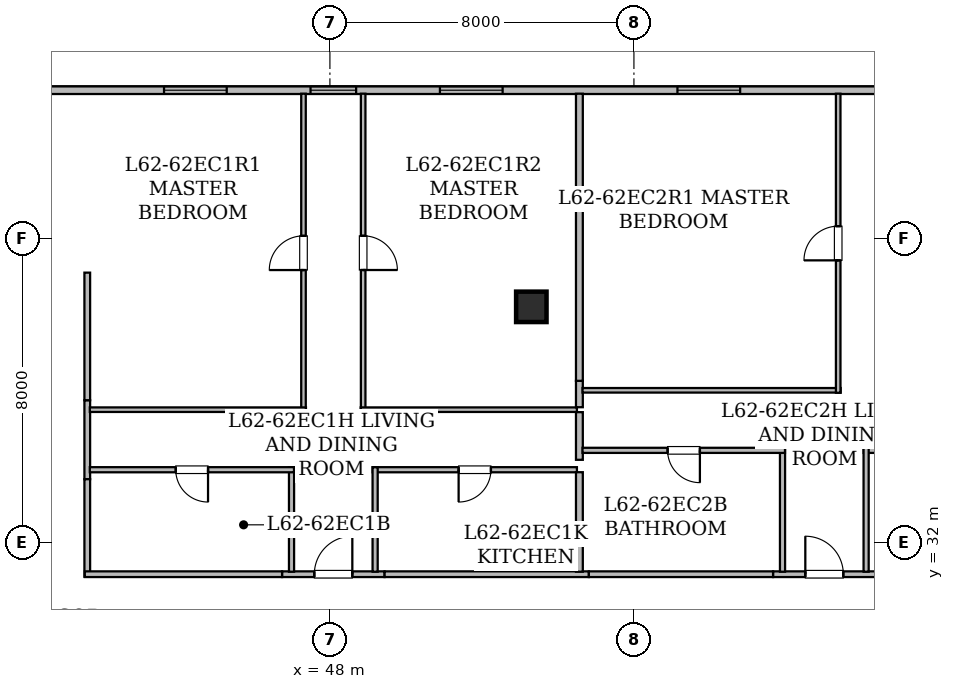
"""IFC4 building model, lengths in metres.
Left out: names, types, materials, properties, quantities, classifications, styles, units other than length and angle.
Written with IfcOpenShell. Run it as: python <this file> out.ifc"""

import sys

from ifc_helpers import new_model, si_unit, direction, frame, frame_2d, origin, origin_2d, place, context, subcontext, project, spatial, rectangle, hollow_rectangle, extrude, element, fill, save


model = new_model("IFC4")
c1 = context("Model", 3, precision=1e-05, world=origin(), true_north=direction((0.0, 1.0)))
c2 = subcontext(c1, "Body", "Model", "MODEL_VIEW")
j1 = project(units=[si_unit("LENGTHUNIT", "METRE"), si_unit("PLANEANGLEUNIT", "RADIAN")], contexts=[c1])
p1 = place(None, origin())
s1 = spatial("IfcSite", under=j1, at=p1, CompositionType="ELEMENT")
p2 = place(p1, origin())
s2 = spatial("IfcBuilding", under=s1, at=p2, CompositionType="ELEMENT")
p3 = place(p2, frame((0.0, 0.0, 242.75)))
s3 = spatial("IfcBuildingStorey", under=s2, at=p3, CompositionType="ELEMENT", Elevation=242.75)
for number, where, z_axis, x_axis in (
    (1, (51.083, 41.5, 0.0), (0.0, 0.0, 1.0), (1.0, 0.0, 0.0)),
    (2, (53.3, 38.2, 0.0), (0.0, 0.0, 1.0), (1.0, 0.0, 0.0)),
):
    element("IfcColumn", number, at=place(p3, frame(where, z_axis=z_axis, x_axis=x_axis)), inside=s3, PredefinedType="COLUMN", context=c2, shape_type="SweptSolid", body=[
        extrude(hollow_rectangle(XDim=0.8, YDim=0.8, WallThickness=0.04, at=origin_2d()), origin(), (0.0, 0.0, 1.0), 3.65),
    ])
p4 = place(p3, frame((24.302, 43.9, 0.0), z_axis=(0.0, 0.0, 1.0), x_axis=(1.0, 0.0, 0.0)))
e3 = element("IfcWall", 3, at=p4, inside=s3, PredefinedType="STANDARD", context=c2, shape_type="SweptSolid", body=[
    extrude(rectangle(XDim=41.457, YDim=0.2, at=frame_2d((20.729, 0.0))), origin(), (0.0, 0.0, 1.0), 3.43),
])
p5 = place(p4, frame((5.573, 0.0, 0.85)))
e4 = element("IfcOpeningElement", 4, at=p5, cuts=e3, PredefinedType="OPENING", context=c2, shape_type="SweptSolid", body=[
    extrude(rectangle(XDim=1.65, YDim=1.55, at=frame_2d((0.825, 0.775))), frame((0.0, 0.11, 0.0), z_axis=(0.0, -1.0, 0.0), x_axis=(1.0, 0.0, 0.0)), (0.0, 0.0, 1.0), 0.22),
])
p6 = place(p4, frame((0.604, 0.0, 0.85)))
e5 = element("IfcOpeningElement", 5, at=p6, cuts=e3, PredefinedType="OPENING", context=c2, shape_type="SweptSolid", body=[
    extrude(rectangle(XDim=1.65, YDim=1.55, at=frame_2d((0.825, 0.775))), frame((0.0, 0.11, 0.0), z_axis=(0.0, -1.0, 0.0), x_axis=(1.0, 0.0, 0.0)), (0.0, 0.0, 1.0), 0.22),
])
p7 = place(p4, frame((23.188, 0.0, 0.8)))
e6 = element("IfcOpeningElement", 6, at=p7, cuts=e3, PredefinedType="OPENING", context=c2, shape_type="SweptSolid", body=[
    extrude(rectangle(XDim=1.2, YDim=1.5, at=frame_2d((0.6, 0.75))), frame((0.0, 0.11, 0.0), z_axis=(0.0, -1.0, 0.0), x_axis=(1.0, 0.0, 0.0)), (0.0, 0.0, 1.0), 0.22),
])
p8 = place(p4, frame((19.333, 0.0, 0.85)))
e7 = element("IfcOpeningElement", 7, at=p8, cuts=e3, PredefinedType="OPENING", context=c2, shape_type="SweptSolid", body=[
    extrude(rectangle(XDim=1.65, YDim=1.55, at=frame_2d((0.825, 0.775))), frame((0.0, 0.11, 0.0), z_axis=(0.0, -1.0, 0.0), x_axis=(1.0, 0.0, 0.0)), (0.0, 0.0, 1.0), 0.22),
])
p9 = place(p4, frame((26.593, 0.0, 0.85)))
e8 = element("IfcOpeningElement", 8, at=p9, cuts=e3, PredefinedType="OPENING", context=c2, shape_type="SweptSolid", body=[
    extrude(rectangle(XDim=1.65, YDim=1.55, at=frame_2d((0.825, 0.775))), frame((0.0, 0.11, 0.0), z_axis=(0.0, -1.0, 0.0), x_axis=(1.0, 0.0, 0.0)), (0.0, 0.0, 1.0), 0.22),
])
p10 = place(p4, frame((32.843, 0.0, 0.85)))
e9 = element("IfcOpeningElement", 9, at=p10, cuts=e3, PredefinedType="OPENING", context=c2, shape_type="SweptSolid", body=[
    extrude(rectangle(XDim=1.65, YDim=1.55, at=frame_2d((0.825, 0.775))), frame((0.0, 0.11, 0.0), z_axis=(0.0, -1.0, 0.0), x_axis=(1.0, 0.0, 0.0)), (0.0, 0.0, 1.0), 0.22),
])
p11 = place(p3, frame((41.615, 35.743, 0.0), z_axis=(0.0, 0.0, 1.0), x_axis=(0.0, -1.0, 0.0)))
e10 = element("IfcWall", 10, at=p11, inside=s3, PredefinedType="STANDARD", context=c2, shape_type="SweptSolid", body=[
    extrude(rectangle(XDim=2.078, YDim=0.15, at=frame_2d((1.039, 0.0))), origin(), (0.0, 0.0, 1.0), 3.43),
])
p12 = place(p3, frame((46.741, 31.165, 0.0), z_axis=(0.0, 0.0, 1.0), x_axis=(1.0, 0.0, 0.0)))
e11 = element("IfcWall", 11, at=p12, inside=s3, PredefinedType="STANDARD", context=c2, shape_type="SweptSolid", body=[
    extrude(rectangle(XDim=2.698, YDim=0.15, at=frame_2d((1.349, 0.0))), origin(), (0.0, 0.0, 1.0), 3.43),
])
p13 = place(p12, frame((0.849, 0.0, 0.0)))
e12 = element("IfcOpeningElement", 12, at=p13, cuts=e11, PredefinedType="OPENING", context=c2, shape_type="SweptSolid", body=[
    extrude(rectangle(XDim=1.0, YDim=2.15, at=frame_2d((0.5, 1.075))), frame((0.0, 0.085, 0.0), z_axis=(0.0, -1.0, 0.0), x_axis=(1.0, 0.0, 0.0)), (0.0, 0.0, 1.0), 0.17),
])
p14 = place(p3, frame((41.615, 33.665, 0.0), z_axis=(0.0, 0.0, 1.0), x_axis=(0.0, -1.0, 0.0)))
e13 = element("IfcWall", 13, at=p14, inside=s3, PredefinedType="STANDARD", context=c2, shape_type="SweptSolid", body=[
    extrude(rectangle(XDim=2.565, YDim=0.15, at=frame_2d((1.282, 0.0))), origin(), (0.0, 0.0, 1.0), 3.107),
])
p15 = place(p3, frame((41.55, 31.165, 0.0), z_axis=(0.0, 0.0, 1.0), x_axis=(1.0, 0.0, 0.0)))
e14 = element("IfcWall", 14, at=p15, inside=s3, PredefinedType="STANDARD", context=c2, shape_type="SweptSolid", body=[
    extrude(rectangle(XDim=5.191, YDim=0.15, at=frame_2d((2.595, 0.0))), origin(), (0.0, 0.0, 1.0), 3.43),
])
p16 = place(p3, frame((49.439, 31.165, 0.0), z_axis=(0.0, 0.0, 1.0), x_axis=(1.0, 0.0, 0.0)))
e15 = element("IfcWall", 15, at=p16, inside=s3, PredefinedType="STANDARD", context=c2, shape_type="SweptSolid", body=[
    extrude(rectangle(XDim=5.375, YDim=0.15, at=frame_2d((2.688, 0.0))), origin(), (0.0, 0.0, 1.0), 2.725),
])
p17 = place(p3, frame((41.615, 39.1, 0.0), z_axis=(0.0, 0.0, 1.0), x_axis=(0.0, -1.0, 0.0)))
e16 = element("IfcWall", 16, at=p17, inside=s3, PredefinedType="STANDARD", context=c2, shape_type="SweptSolid", body=[
    extrude(rectangle(XDim=3.357, YDim=0.15, at=frame_2d((1.679, 0.0))), origin(), (0.0, 0.0, 1.0), 2.725),
])
p18 = place(p3, frame((59.661, 31.165, 0.0), z_axis=(0.0, 0.0, 1.0), x_axis=(1.0, 0.0, 0.0)))
e17 = element("IfcWall", 17, at=p18, inside=s3, PredefinedType="STANDARD", context=c2, shape_type="SweptSolid", body=[
    extrude(rectangle(XDim=2.698, YDim=0.15, at=frame_2d((1.349, 0.0))), origin(), (0.0, 0.0, 1.0), 3.43),
])
p19 = place(p18, frame((0.849, 0.0, 0.0)))
e18 = element("IfcOpeningElement", 18, at=p19, cuts=e17, PredefinedType="OPENING", context=c2, shape_type="SweptSolid", body=[
    extrude(rectangle(XDim=1.0, YDim=2.15, at=frame_2d((0.5, 1.075))), frame((0.0, 0.085, 0.0), z_axis=(0.0, -1.0, 0.0), x_axis=(1.0, 0.0, 0.0)), (0.0, 0.0, 1.0), 0.17),
])
p20 = place(p3, frame((54.814, 31.165, 0.0), z_axis=(0.0, 0.0, 1.0), x_axis=(1.0, 0.0, 0.0)))
e19 = element("IfcWall", 19, at=p20, inside=s3, PredefinedType="STANDARD", context=c2, shape_type="SweptSolid", body=[
    extrude(rectangle(XDim=4.847, YDim=0.15, at=frame_2d((2.423, 0.0))), origin(), (0.0, 0.0, 1.0), 3.43),
])
p21 = place(p3, frame((46.99, 31.23, 0.0), z_axis=(0.0, 0.0, 1.0), x_axis=(0.0, 1.0, 0.0)))
e20 = element("IfcWall", 20, at=p21, inside=s3, PredefinedType="PARTITIONING", context=c2, shape_type="SweptSolid", body=[
    extrude(rectangle(XDim=2.749, YDim=0.135, at=frame_2d((1.375, 0.0))), origin(), (0.0, 0.0, 1.0), 3.107),
])
p22 = place(p3, frame((47.055, 33.914, 0.0), z_axis=(0.0, 0.0, 1.0), x_axis=(-1.0, 0.0, 0.0)))
e21 = element("IfcWall", 21, at=p22, inside=s3, PredefinedType="PARTITIONING", context=c2, shape_type="SweptSolid", body=[
    extrude(rectangle(XDim=5.373, YDim=0.135, at=frame_2d((2.687, 0.0))), origin(), (0.0, 0.0, 1.0), 3.43),
])
p23 = place(p22, frame((2.262, 0.0, 0.0)))
e22 = element("IfcOpeningElement", 22, at=p23, cuts=e21, PredefinedType="OPENING", context=c2, shape_type="SweptSolid", body=[
    extrude(rectangle(XDim=0.85, YDim=2.1, at=frame_2d((0.425, 1.05))), frame((0.0, 0.077, 0.0), z_axis=(0.0, -1.0, 0.0), x_axis=(1.0, 0.0, 0.0)), (0.0, 0.0, 1.0), 0.155),
])
p24 = place(p3, frame((54.5, 33.914, 0.0), z_axis=(0.0, 0.0, 1.0), x_axis=(-1.0, 0.0, 0.0)))
e23 = element("IfcWall", 23, at=p24, inside=s3, PredefinedType="PARTITIONING", context=c2, shape_type="SweptSolid", body=[
    extrude(rectangle(XDim=5.375, YDim=0.135, at=frame_2d((2.688, 0.0))), origin(), (0.0, 0.0, 1.0), 2.725),
])
p25 = place(p24, frame((2.263, 0.0, 0.0)))
e24 = element("IfcOpeningElement", 24, at=p25, cuts=e23, PredefinedType="OPENING", context=c2, shape_type="SweptSolid", body=[
    extrude(rectangle(XDim=0.85, YDim=2.1, at=frame_2d((0.425, 1.05))), frame((0.0, 0.077, 0.0), z_axis=(0.0, -1.0, 0.0), x_axis=(1.0, 0.0, 0.0)), (0.0, 0.0, 1.0), 0.155),
])
p26 = place(p3, frame((49.19, 33.979, 0.0), z_axis=(0.0, 0.0, 1.0), x_axis=(0.0, -1.0, 0.0)))
e25 = element("IfcWall", 25, at=p26, inside=s3, PredefinedType="PARTITIONING", context=c2, shape_type="SweptSolid", body=[
    extrude(rectangle(XDim=2.749, YDim=0.135, at=frame_2d((1.375, 0.0))), origin(), (0.0, 0.0, 1.0), 3.107),
])
p27 = place(p3, frame((47.305, 35.429, 0.0), z_axis=(0.0, 0.0, 1.0), x_axis=(0.0, 1.0, 0.0)))
e26 = element("IfcWall", 26, at=p27, inside=s3, PredefinedType="PARTITIONING", context=c2, shape_type="SweptSolid", body=[
    extrude(rectangle(XDim=8.379, YDim=0.12, at=frame_2d((4.189, 0.0))), origin(), (0.0, 0.0, 1.0), 2.725),
])
p28 = place(p27, frame((3.739, 0.0, 0.0)))
e27 = element("IfcOpeningElement", 27, at=p28, cuts=e26, PredefinedType="OPENING", context=c2, shape_type="SweptSolid", body=[
    extrude(rectangle(XDim=0.9, YDim=2.1, at=frame_2d((0.45, 1.05))), frame((0.0, 0.07, 0.0), z_axis=(0.0, -1.0, 0.0), x_axis=(1.0, 0.0, 0.0)), (0.0, 0.0, 1.0), 0.14),
])
p29 = place(p3, frame((41.682, 35.494, 0.0), z_axis=(0.0, 0.0, 1.0), x_axis=(1.0, 0.0, 0.0)))
e28 = element("IfcWall", 28, at=p29, inside=s3, PredefinedType="PARTITIONING", context=c2, shape_type="SweptSolid", body=[
    extrude(rectangle(XDim=5.688, YDim=0.12, at=frame_2d((2.844, 0.0))), origin(), (0.0, 0.0, 1.0), 3.43),
])
p30 = place(p3, frame((48.875, 43.808, 0.0), z_axis=(0.0, 0.0, 1.0), x_axis=(0.0, -1.0, 0.0)))
e29 = element("IfcWall", 29, at=p30, inside=s3, PredefinedType="PARTITIONING", context=c2, shape_type="SweptSolid", body=[
    extrude(rectangle(XDim=8.379, YDim=0.12, at=frame_2d((4.189, 0.0))), origin(), (0.0, 0.0, 1.0), 2.725),
])
p31 = place(p30, frame((3.739, 0.0, 0.0)))
e30 = element("IfcOpeningElement", 30, at=p31, cuts=e29, PredefinedType="OPENING", context=c2, shape_type="SweptSolid", body=[
    extrude(rectangle(XDim=0.9, YDim=2.1, at=frame_2d((0.45, 1.05))), frame((0.0, 0.07, 0.0), z_axis=(0.0, -1.0, 0.0), x_axis=(1.0, 0.0, 0.0)), (0.0, 0.0, 1.0), 0.14),
])
p32 = place(p3, frame((48.81, 35.494, 0.0), z_axis=(0.0, 0.0, 1.0), x_axis=(1.0, 0.0, 0.0)))
e31 = element("IfcWall", 31, at=p32, inside=s3, PredefinedType="PARTITIONING", context=c2, shape_type="SweptSolid", body=[
    extrude(rectangle(XDim=5.69, YDim=0.12, at=frame_2d((2.845, 0.0))), origin(), (0.0, 0.0, 1.0), 2.725),
])
p33 = place(p3, frame((54.565, 35.429, 0.0), z_axis=(0.0, 0.0, 1.0), x_axis=(0.0, -1.0, 0.0)))
e32 = element("IfcWall", 32, at=p33, inside=s3, PredefinedType="STANDARD", context=c2, shape_type="SweptSolid", body=[
    extrude(rectangle(XDim=1.254, YDim=0.18, at=frame_2d((0.627, 0.0))), origin(), (0.0, 0.0, 1.0), 3.43),
])
p34 = place(p3, frame((54.565, 33.849, 0.0), z_axis=(0.0, 0.0, 1.0), x_axis=(0.0, -1.0, 0.0)))
e33 = element("IfcWall", 33, at=p34, inside=s3, PredefinedType="STANDARD", context=c2, shape_type="SweptSolid", body=[
    extrude(rectangle(XDim=2.619, YDim=0.18, at=frame_2d((1.31, 0.0))), origin(), (0.0, 0.0, 1.0), 3.107),
])
p35 = place(p3, frame((54.565, 36.253, 0.0), z_axis=(0.0, 0.0, 1.0), x_axis=(0.0, -1.0, 0.0)))
e34 = element("IfcWall", 34, at=p35, inside=s3, PredefinedType="STANDARD", context=c2, shape_type="SweptSolid", body=[
    extrude(rectangle(XDim=0.694, YDim=0.18, at=frame_2d((0.347, 0.0))), origin(), (0.0, 0.0, 1.0), 3.43),
])
p36 = place(p3, frame((54.565, 43.808, 0.0), z_axis=(0.0, 0.0, 1.0), x_axis=(0.0, -1.0, 0.0)))
e35 = element("IfcWall", 35, at=p36, inside=s3, PredefinedType="STANDARD", context=c2, shape_type="SweptSolid", body=[
    extrude(rectangle(XDim=7.555, YDim=0.18, at=frame_2d((3.778, 0.0))), origin(), (0.0, 0.0, 1.0), 2.725),
])
p37 = place(p3, frame((59.91, 31.23, 0.0), z_axis=(0.0, 0.0, 1.0), x_axis=(0.0, 1.0, 0.0)))
e36 = element("IfcWall", 36, at=p37, inside=s3, PredefinedType="PARTITIONING", context=c2, shape_type="SweptSolid", body=[
    extrude(rectangle(XDim=3.259, YDim=0.135, at=frame_2d((1.629, 0.0))), origin(), (0.0, 0.0, 1.0), 3.107),
])
p38 = place(p3, frame((59.975, 34.424, 0.0), z_axis=(0.0, 0.0, 1.0), x_axis=(-1.0, 0.0, 0.0)))
e37 = element("IfcWall", 37, at=p38, inside=s3, PredefinedType="PARTITIONING", context=c2, shape_type="SweptSolid", body=[
    extrude(rectangle(XDim=5.328, YDim=0.135, at=frame_2d((2.664, 0.0))), origin(), (0.0, 0.0, 1.0), 3.43),
])
p39 = place(p38, frame((2.239, 0.0, 0.0)))
e38 = element("IfcOpeningElement", 38, at=p39, cuts=e37, PredefinedType="OPENING", context=c2, shape_type="SweptSolid", body=[
    extrude(rectangle(XDim=0.85, YDim=2.1, at=frame_2d((0.425, 1.05))), frame((0.0, 0.077, 0.0), z_axis=(0.0, -1.0, 0.0), x_axis=(1.0, 0.0, 0.0)), (0.0, 0.0, 1.0), 0.155),
])
p40 = place(p3, frame((69.608, 34.424, 0.0), z_axis=(0.0, 0.0, 1.0), x_axis=(-1.0, 0.0, 0.0)))
e39 = element("IfcWall", 39, at=p40, inside=s3, PredefinedType="PARTITIONING", context=c2, shape_type="SweptSolid", body=[
    extrude(rectangle(XDim=7.563, YDim=0.135, at=frame_2d((3.781, 0.0))), origin(), (0.0, 0.0, 1.0), 2.725),
])
p41 = place(p40, frame((3.357, 0.0, 0.0)))
e40 = element("IfcOpeningElement", 40, at=p41, cuts=e39, PredefinedType="OPENING", context=c2, shape_type="SweptSolid", body=[
    extrude(rectangle(XDim=0.85, YDim=2.1, at=frame_2d((0.425, 1.05))), frame((0.0, 0.077, 0.0), z_axis=(0.0, -1.0, 0.0), x_axis=(1.0, 0.0, 0.0)), (0.0, 0.0, 1.0), 0.155),
])
p42 = place(p3, frame((62.11, 34.489, 0.0), z_axis=(0.0, 0.0, 1.0), x_axis=(0.0, -1.0, 0.0)))
e41 = element("IfcWall", 41, at=p42, inside=s3, PredefinedType="PARTITIONING", context=c2, shape_type="SweptSolid", body=[
    extrude(rectangle(XDim=3.259, YDim=0.135, at=frame_2d((1.629, 0.0))), origin(), (0.0, 0.0, 1.0), 3.107),
])
p43 = place(p3, frame((54.647, 36.004, 0.0), z_axis=(0.0, 0.0, 1.0), x_axis=(1.0, 0.0, 0.0)))
e42 = element("IfcWall", 42, at=p43, inside=s3, PredefinedType="PARTITIONING", context=c2, shape_type="SweptSolid", body=[
    extrude(rectangle(XDim=6.793, YDim=0.12, at=frame_2d((3.396, 0.0))), origin(), (0.0, 0.0, 1.0), 2.725),
])
p44 = place(p3, frame((61.375, 35.939, 0.0), z_axis=(0.0, 0.0, 1.0), x_axis=(0.0, 1.0, 0.0)))
e43 = element("IfcWall", 43, at=p44, inside=s3, PredefinedType="PARTITIONING", context=c2, shape_type="SweptSolid", body=[
    extrude(rectangle(XDim=7.869, YDim=0.12, at=frame_2d((3.935, 0.0))), origin(), (0.0, 0.0, 1.0), 2.725),
])
p45 = place(p44, frame((3.484, 0.0, 0.0)))
e44 = element("IfcOpeningElement", 44, at=p45, cuts=e43, PredefinedType="OPENING", context=c2, shape_type="SweptSolid", body=[
    extrude(rectangle(XDim=0.9, YDim=2.1, at=frame_2d((0.45, 1.05))), frame((0.0, 0.07, 0.0), z_axis=(0.0, -1.0, 0.0), x_axis=(1.0, 0.0, 0.0)), (0.0, 0.0, 1.0), 0.14),
])
p46 = place(p7, origin())
e45 = element("IfcWindow", 45, at=p46, inside=s3, PartitioningType="SINGLE_PANEL", PredefinedType="WINDOW", context=c2, shape_type="SweptSolid", body=[
    extrude(rectangle(XDim=1.2, YDim=1.5, at=frame_2d((0.6, 0.75))), frame((0.0, 0.03, 0.0), z_axis=(0.0, -1.0, 0.0), x_axis=(1.0, 0.0, 0.0)), (0.0, 0.0, 1.0), 0.06),
])
fill(e6, e45)
p47 = place(p8, origin())
e46 = element("IfcWindow", 46, at=p47, inside=s3, PartitioningType="SINGLE_PANEL", PredefinedType="WINDOW", context=c2, shape_type="SweptSolid", body=[
    extrude(rectangle(XDim=1.65, YDim=1.55, at=frame_2d((0.825, 0.775))), frame((0.0, 0.03, 0.0), z_axis=(0.0, -1.0, 0.0), x_axis=(1.0, 0.0, 0.0)), (0.0, 0.0, 1.0), 0.06),
])
fill(e7, e46)
p48 = place(p9, origin())
e47 = element("IfcWindow", 47, at=p48, inside=s3, PartitioningType="SINGLE_PANEL", PredefinedType="WINDOW", context=c2, shape_type="SweptSolid", body=[
    extrude(rectangle(XDim=1.65, YDim=1.55, at=frame_2d((0.825, 0.775))), frame((0.0, 0.03, 0.0), z_axis=(0.0, -1.0, 0.0), x_axis=(1.0, 0.0, 0.0)), (0.0, 0.0, 1.0), 0.06),
])
fill(e8, e47)
p49 = place(p10, origin())
e48 = element("IfcWindow", 48, at=p49, inside=s3, PartitioningType="SINGLE_PANEL", PredefinedType="WINDOW", context=c2, shape_type="SweptSolid", body=[
    extrude(rectangle(XDim=1.65, YDim=1.55, at=frame_2d((0.825, 0.775))), frame((0.0, 0.03, 0.0), z_axis=(0.0, -1.0, 0.0), x_axis=(1.0, 0.0, 0.0)), (0.0, 0.0, 1.0), 0.06),
])
fill(e9, e48)
p50 = place(p13, origin())
e49 = element("IfcDoor", 49, at=p50, inside=s3, OperationType="SINGLE_SWING_RIGHT", PredefinedType="DOOR", context=c2, shape_type="SweptSolid", body=[
    extrude(rectangle(XDim=1.0, YDim=2.15, at=frame_2d((0.5, 1.075))), frame((0.0, 0.025, 0.0), z_axis=(0.0, -1.0, 0.0), x_axis=(1.0, 0.0, 0.0)), (0.0, 0.0, 1.0), 0.05),
])
fill(e12, e49)
p51 = place(p19, origin())
e50 = element("IfcDoor", 50, at=p51, inside=s3, OperationType="SINGLE_SWING_LEFT", PredefinedType="DOOR", context=c2, shape_type="SweptSolid", body=[
    extrude(rectangle(XDim=1.0, YDim=2.15, at=frame_2d((0.5, 1.075))), frame((0.0, 0.025, 0.0), z_axis=(0.0, -1.0, 0.0), x_axis=(1.0, 0.0, 0.0)), (0.0, 0.0, 1.0), 0.05),
])
fill(e18, e50)
p52 = place(p23, origin())
e51 = element("IfcDoor", 51, at=p52, inside=s3, OperationType="SINGLE_SWING_LEFT", PredefinedType="DOOR", context=c2, shape_type="SweptSolid", body=[
    extrude(rectangle(XDim=0.85, YDim=2.1, at=frame_2d((0.425, 1.05))), frame((0.0, 0.025, 0.0), z_axis=(0.0, -1.0, 0.0), x_axis=(1.0, 0.0, 0.0)), (0.0, 0.0, 1.0), 0.05),
])
fill(e22, e51)
p53 = place(p25, origin())
e52 = element("IfcDoor", 52, at=p53, inside=s3, OperationType="SINGLE_SWING_RIGHT", PredefinedType="DOOR", context=c2, shape_type="SweptSolid", body=[
    extrude(rectangle(XDim=0.85, YDim=2.1, at=frame_2d((0.425, 1.05))), frame((0.0, 0.025, 0.0), z_axis=(0.0, -1.0, 0.0), x_axis=(1.0, 0.0, 0.0)), (0.0, 0.0, 1.0), 0.05),
])
fill(e24, e52)
p54 = place(p28, origin())
e53 = element("IfcDoor", 53, at=p54, inside=s3, OperationType="SINGLE_SWING_LEFT", PredefinedType="DOOR", context=c2, shape_type="SweptSolid", body=[
    extrude(rectangle(XDim=0.9, YDim=2.1, at=frame_2d((0.45, 1.05))), frame((0.0, 0.025, 0.0), z_axis=(0.0, -1.0, 0.0), x_axis=(1.0, 0.0, 0.0)), (0.0, 0.0, 1.0), 0.05),
])
fill(e27, e53)
p55 = place(p31, origin())
e54 = element("IfcDoor", 54, at=p55, inside=s3, OperationType="SINGLE_SWING_RIGHT", PredefinedType="DOOR", context=c2, shape_type="SweptSolid", body=[
    extrude(rectangle(XDim=0.9, YDim=2.1, at=frame_2d((0.45, 1.05))), frame((0.0, 0.025, 0.0), z_axis=(0.0, -1.0, 0.0), x_axis=(1.0, 0.0, 0.0)), (0.0, 0.0, 1.0), 0.05),
])
fill(e30, e54)
p56 = place(p39, origin())
e55 = element("IfcDoor", 55, at=p56, inside=s3, OperationType="SINGLE_SWING_LEFT", PredefinedType="DOOR", context=c2, shape_type="SweptSolid", body=[
    extrude(rectangle(XDim=0.85, YDim=2.1, at=frame_2d((0.425, 1.05))), frame((0.0, 0.025, 0.0), z_axis=(0.0, -1.0, 0.0), x_axis=(1.0, 0.0, 0.0)), (0.0, 0.0, 1.0), 0.05),
])
fill(e38, e55)
p57 = place(p45, origin())
e56 = element("IfcDoor", 56, at=p57, inside=s3, OperationType="SINGLE_SWING_LEFT", PredefinedType="DOOR", context=c2, shape_type="SweptSolid", body=[
    extrude(rectangle(XDim=0.9, YDim=2.1, at=frame_2d((0.45, 1.05))), frame((0.0, 0.025, 0.0), z_axis=(0.0, -1.0, 0.0), x_axis=(1.0, 0.0, 0.0)), (0.0, 0.0, 1.0), 0.05),
])
fill(e44, e56)
save(model, sys.argv[1])
